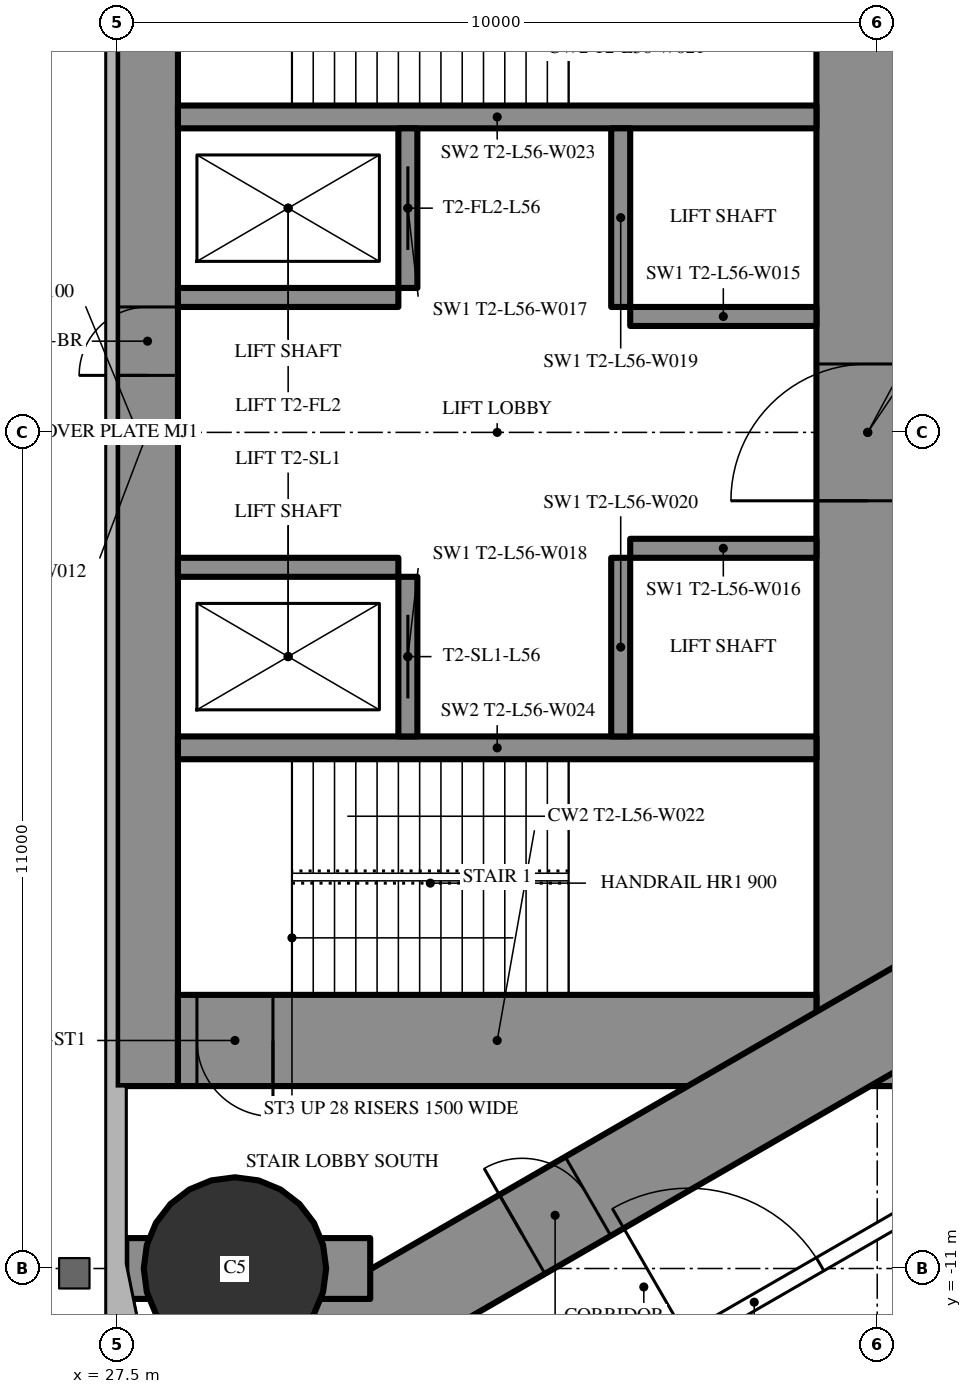
"""IFC4 building model, lengths in metres.
Left out: names, types, materials, properties, quantities, classifications, styles, units other than length and angle.
Written with IfcOpenShell. Run it as: python <this file> out.ifc"""

import sys

from ifc_helpers import new_model, si_unit, direction, frame, frame_2d, origin, origin_2d, place, context, subcontext, project, spatial, rectangle, hollow_circle, extrude, element, fill, save


model = new_model("IFC4")
c1 = context("Model", 3, precision=1e-05, world=origin(), true_north=direction((0.0, 1.0)))
c2 = subcontext(c1, "Body", "Model", "MODEL_VIEW")
j1 = project(units=[si_unit("LENGTHUNIT", "METRE"), si_unit("PLANEANGLEUNIT", "RADIAN")], contexts=[c1])
p1 = place(None, origin())
s1 = spatial("IfcSite", under=j1, at=p1, CompositionType="ELEMENT")
p2 = place(p1, origin())
s2 = spatial("IfcBuilding", under=s1, at=p2, CompositionType="ELEMENT")
p3 = place(p2, frame((0.0, 0.0, 210.3)))
s3 = spatial("IfcBuildingStorey", under=s2, at=p3, CompositionType="ELEMENT", Elevation=210.3)
p4 = place(p3, frame((29.05, -11.0, 0.0), z_axis=(0.0, 0.0, 1.0), x_axis=(1.0, 0.0, 0.0)))
e1 = element("IfcColumn", 1, at=p4, inside=s3, PredefinedType="COLUMN", context=c2, shape_type="SweptSolid", body=[
    extrude(hollow_circle(Radius=1.2, WallThickness=0.09, at=origin_2d()), origin(), (0.0, 0.0, 1.0), 5.0),
])
p5 = place(p3, frame((27.9, -8.6, 0.0), z_axis=(0.0, 0.0, 1.0), x_axis=(0.0, 1.0, 0.0)))
e2 = element("IfcWall", 2, at=p5, inside=s3, PredefinedType="SHEAR", context=c2, shape_type="SweptSolid", body=[
    extrude(rectangle(XDim=17.2, YDim=0.8, at=frame_2d((8.6, 0.0))), origin(), (0.0, 0.0, 1.0), 5.0),
])
p6 = place(p5, frame((9.35, 0.0, 0.0)))
e3 = element("IfcOpeningElement", 3, at=p6, cuts=e2, PredefinedType="OPENING", context=c2, shape_type="SweptSolid", body=[
    extrude(rectangle(XDim=0.9, YDim=2.2, at=frame_2d((0.45, 1.1))), frame((0.0, 0.41, 0.0), z_axis=(0.0, -1.0, 0.0), x_axis=(1.0, 0.0, 0.0)), (0.0, 0.0, 1.0), 0.82),
])
p7 = place(p3, frame((37.375, -8.6, 0.0), z_axis=(0.0, 0.0, 1.0), x_axis=(0.0, 1.0, 0.0)))
e4 = element("IfcWall", 4, at=p7, inside=s3, PredefinedType="SHEAR", context=c2, shape_type="SweptSolid", body=[
    extrude(rectangle(XDim=17.2, YDim=1.35, at=frame_2d((8.6, 0.0))), origin(), (0.0, 0.0, 1.0), 5.0),
])
p8 = place(p7, frame((7.7, 0.0, 0.0)))
e5 = element("IfcOpeningElement", 5, at=p8, cuts=e4, PredefinedType="OPENING", context=c2, shape_type="SweptSolid", body=[
    extrude(rectangle(XDim=1.8, YDim=2.2, at=frame_2d((0.9, 1.1))), frame((0.0, 0.685, 0.0), z_axis=(0.0, -1.0, 0.0), x_axis=(1.0, 0.0, 0.0)), (0.0, 0.0, 1.0), 1.37),
])
p9 = place(p3, frame((28.3, -8.0, 0.0), z_axis=(0.0, 0.0, 1.0), x_axis=(1.0, 0.0, 0.0)))
e6 = element("IfcWall", 6, at=p9, inside=s3, PredefinedType="SHEAR", context=c2, shape_type="SweptSolid", body=[
    extrude(rectangle(XDim=8.4, YDim=1.2, at=frame_2d((4.2, 0.0))), origin(), (0.0, 0.0, 1.0), 5.0),
])
p10 = place(p9, frame((0.25, 0.0, 0.0)))
e7 = element("IfcOpeningElement", 7, at=p10, cuts=e6, PredefinedType="OPENING", context=c2, shape_type="SweptSolid", body=[
    extrude(rectangle(XDim=1.0, YDim=2.2, at=frame_2d((0.5, 1.1))), frame((0.0, 0.61, 0.0), z_axis=(0.0, -1.0, 0.0), x_axis=(1.0, 0.0, 0.0)), (0.0, 0.0, 1.0), 1.22),
])
for number, where, z_axis, x_axis in (
    (8, (28.3, -4.15, 0.0), (0.0, 0.0, 1.0), (1.0, 0.0, 0.0)),
    (9, (28.3, 4.15, 0.0), (0.0, 0.0, 1.0), (1.0, 0.0, 0.0)),
):
    element("IfcWall", number, at=place(p3, frame(where, z_axis=z_axis, x_axis=x_axis)), inside=s3, PredefinedType="SHEAR", context=c2, shape_type="SweptSolid", body=[
        extrude(rectangle(XDim=8.4, YDim=0.3, at=frame_2d((4.2, 0.0))), origin(), (0.0, 0.0, 1.0), 5.0),
    ])
p11 = place(p3, frame((31.325, -4.0, 0.0), z_axis=(0.0, 0.0, 1.0), x_axis=(0.0, 1.0, 0.0)))
e10 = element("IfcWall", 10, at=p11, inside=s3, PredefinedType="SHEAR", context=c2, shape_type="SweptSolid", body=[
    extrude(rectangle(XDim=2.1, YDim=0.25, at=frame_2d((1.05, 0.0))), origin(), (0.0, 0.0, 1.0), 5.0),
])
p12 = place(p11, frame((0.5, 0.0, 0.0)))
e11 = element("IfcOpeningElement", 11, at=p12, cuts=e10, PredefinedType="OPENING", context=c2, shape_type="SweptSolid", body=[
    extrude(rectangle(XDim=1.1, YDim=2.2, at=frame_2d((0.55, 1.1))), frame((0.0, 0.135, 0.0), z_axis=(0.0, -1.0, 0.0), x_axis=(1.0, 0.0, 0.0)), (0.0, 0.0, 1.0), 0.27),
])
p13 = place(p3, frame((34.125, -4.0, 0.0), z_axis=(0.0, 0.0, 1.0), x_axis=(0.0, 1.0, 0.0)))
e12 = element("IfcWall", 12, at=p13, inside=s3, PredefinedType="SHEAR", context=c2, shape_type="SweptSolid", body=[
    extrude(rectangle(XDim=2.35, YDim=0.25, at=frame_2d((1.175, 0.0))), origin(), (0.0, 0.0, 1.0), 5.0),
])
p14 = place(p3, frame((28.3, -1.775, 0.0), z_axis=(0.0, 0.0, 1.0), x_axis=(1.0, 0.0, 0.0)))
e13 = element("IfcWall", 13, at=p14, inside=s3, PredefinedType="SHEAR", context=c2, shape_type="SweptSolid", body=[
    extrude(rectangle(XDim=2.9, YDim=0.25, at=frame_2d((1.45, 0.0))), origin(), (0.0, 0.0, 1.0), 5.0),
])
p15 = place(p3, frame((34.25, -1.525, 0.0), z_axis=(0.0, 0.0, 1.0), x_axis=(1.0, 0.0, 0.0)))
e14 = element("IfcWall", 14, at=p15, inside=s3, PredefinedType="SHEAR", context=c2, shape_type="SweptSolid", body=[
    extrude(rectangle(XDim=2.45, YDim=0.25, at=frame_2d((1.225, 0.0))), origin(), (0.0, 0.0, 1.0), 5.0),
])
p16 = place(p3, frame((31.325, 1.9, 0.0), z_axis=(0.0, 0.0, 1.0), x_axis=(0.0, 1.0, 0.0)))
e15 = element("IfcWall", 15, at=p16, inside=s3, PredefinedType="SHEAR", context=c2, shape_type="SweptSolid", body=[
    extrude(rectangle(XDim=2.1, YDim=0.25, at=frame_2d((1.05, 0.0))), origin(), (0.0, 0.0, 1.0), 5.0),
])
p17 = place(p16, frame((0.5, 0.0, 0.0)))
e16 = element("IfcOpeningElement", 16, at=p17, cuts=e15, PredefinedType="OPENING", context=c2, shape_type="SweptSolid", body=[
    extrude(rectangle(XDim=1.1, YDim=2.2, at=frame_2d((0.55, 1.1))), frame((0.0, 0.135, 0.0), z_axis=(0.0, -1.0, 0.0), x_axis=(1.0, 0.0, 0.0)), (0.0, 0.0, 1.0), 0.27),
])
p18 = place(p3, frame((34.125, 1.65, 0.0), z_axis=(0.0, 0.0, 1.0), x_axis=(0.0, 1.0, 0.0)))
e17 = element("IfcWall", 17, at=p18, inside=s3, PredefinedType="SHEAR", context=c2, shape_type="SweptSolid", body=[
    extrude(rectangle(XDim=2.35, YDim=0.25, at=frame_2d((1.175, 0.0))), origin(), (0.0, 0.0, 1.0), 5.0),
])
p19 = place(p3, frame((28.3, 1.775, 0.0), z_axis=(0.0, 0.0, 1.0), x_axis=(1.0, 0.0, 0.0)))
e18 = element("IfcWall", 18, at=p19, inside=s3, PredefinedType="SHEAR", context=c2, shape_type="SweptSolid", body=[
    extrude(rectangle(XDim=2.9, YDim=0.25, at=frame_2d((1.45, 0.0))), origin(), (0.0, 0.0, 1.0), 5.0),
])
p20 = place(p3, frame((34.25, 1.525, 0.0), z_axis=(0.0, 0.0, 1.0), x_axis=(1.0, 0.0, 0.0)))
e19 = element("IfcWall", 19, at=p20, inside=s3, PredefinedType="SHEAR", context=c2, shape_type="SweptSolid", body=[
    extrude(rectangle(XDim=2.45, YDim=0.25, at=frame_2d((1.225, 0.0))), origin(), (0.0, 0.0, 1.0), 5.0),
])
p21 = place(p3, frame((27.2, -13.8, 0.0), z_axis=(0.0, 0.0, 1.0), x_axis=(0.866027159892, 0.499996958321, 0.0)))
e20 = element("IfcWall", 20, at=p21, inside=s3, PredefinedType="SHEAR", context=c2, shape_type="SweptSolid", body=[
    extrude(rectangle(XDim=27.947, YDim=1.2, at=frame_2d((13.973, 0.0))), origin(), (0.0, 0.0, 1.0), 5.0),
])
p22 = place(p21, frame((6.5, 0.0, 0.0)))
e21 = element("IfcOpeningElement", 21, at=p22, cuts=e20, PredefinedType="OPENING", context=c2, shape_type="SweptSolid", body=[
    extrude(rectangle(XDim=1.0, YDim=2.2, at=frame_2d((0.5, 1.1))), frame((0.0, 0.61, 0.0), z_axis=(0.0, -1.0, 0.0), x_axis=(1.0, 0.0, 0.0)), (0.0, 0.0, 1.0), 1.22),
])
p23 = place(p21, frame((13.568, 0.0, 0.0)))
e22 = element("IfcOpeningElement", 22, at=p23, cuts=e20, PredefinedType="OPENING", context=c2, shape_type="SweptSolid", body=[
    extrude(rectangle(XDim=1.8, YDim=2.2, at=frame_2d((0.9, 1.1))), frame((0.0, 0.61, 0.0), z_axis=(0.0, -1.0, 0.0), x_axis=(1.0, 0.0, 0.0)), (0.0, 0.0, 1.0), 1.22),
])
p24 = place(p3, frame((27.2, 13.8, 0.0), z_axis=(0.0, 0.0, 1.0), x_axis=(0.866024515034, -0.500001539357, 0.0)))
e23 = element("IfcWall", 23, at=p24, inside=s3, PredefinedType="SHEAR", context=c2, shape_type="SweptSolid", body=[
    extrude(rectangle(XDim=26.907, YDim=1.2, at=frame_2d((13.454, 0.0))), origin(), (0.0, 0.0, 1.0), 5.0),
])
p25 = place(p24, frame((6.5, 0.0, 0.0)))
e24 = element("IfcOpeningElement", 24, at=p25, cuts=e23, PredefinedType="OPENING", context=c2, shape_type="SweptSolid", body=[
    extrude(rectangle(XDim=1.0, YDim=2.2, at=frame_2d((0.5, 1.1))), frame((0.0, 0.61, 0.0), z_axis=(0.0, -1.0, 0.0), x_axis=(1.0, 0.0, 0.0)), (0.0, 0.0, 1.0), 1.22),
])
p26 = place(p24, frame((13.568, 0.0, 0.0)))
e25 = element("IfcOpeningElement", 25, at=p26, cuts=e23, PredefinedType="OPENING", context=c2, shape_type="SweptSolid", body=[
    extrude(rectangle(XDim=1.8, YDim=2.2, at=frame_2d((0.9, 1.1))), frame((0.0, 0.61, 0.0), z_axis=(0.0, -1.0, 0.0), x_axis=(1.0, 0.0, 0.0)), (0.0, 0.0, 1.0), 1.22),
])
p27 = place(p3, frame((27.62, -11.0, 0.0), z_axis=(0.0, 0.0, 1.0), x_axis=(1.0, 0.0, 0.0)))
e26 = element("IfcWall", 26, at=p27, inside=s3, PredefinedType="SHEAR", context=c2, shape_type="SweptSolid", body=[
    extrude(rectangle(XDim=3.209, YDim=0.8, at=frame_2d((1.605, 0.0))), origin(), (0.0, 0.0, 1.0), 5.0),
])
p28 = place(p3, frame((28.959, -15.44, 0.0), z_axis=(0.0, 0.0, 1.0), x_axis=(0.866025227435, 0.500000305447, 0.0)))
e27 = element("IfcWall", 27, at=p28, inside=s3, PredefinedType="PARTITIONING", context=c2, shape_type="SweptSolid", body=[
    extrude(rectangle(XDim=30.88, YDim=0.2, at=frame_2d((15.44, 0.0))), origin(), (0.0, 0.0, 1.0), 4.75),
])
p29 = place(p28, frame((6.994, 0.0, 0.0)))
e28 = element("IfcOpeningElement", 28, at=p29, cuts=e27, PredefinedType="OPENING", context=c2, shape_type="SweptSolid", body=[
    extrude(rectangle(XDim=2.0, YDim=2.4, at=frame_2d((1.0, 1.2))), frame((0.0, 0.11, 0.0), z_axis=(0.0, -1.0, 0.0), x_axis=(1.0, 0.0, 0.0)), (0.0, 0.0, 1.0), 0.22),
])
p30 = place(p28, frame((16.36, 0.0, 0.0)))
e29 = element("IfcOpeningElement", 29, at=p30, cuts=e27, PredefinedType="OPENING", context=c2, shape_type="SweptSolid", body=[
    extrude(rectangle(XDim=1.8, YDim=2.2, at=frame_2d((0.9, 1.1))), frame((0.0, 0.11, 0.0), z_axis=(0.0, -1.0, 0.0), x_axis=(1.0, 0.0, 0.0)), (0.0, 0.0, 1.0), 0.22),
])
p31 = place(p28, frame((21.118, 0.0, 0.0)))
e30 = element("IfcOpeningElement", 30, at=p31, cuts=e27, PredefinedType="OPENING", context=c2, shape_type="SweptSolid", body=[
    extrude(rectangle(XDim=1.8, YDim=2.2, at=frame_2d((0.9, 1.1))), frame((0.0, 0.11, 0.0), z_axis=(0.0, -1.0, 0.0), x_axis=(1.0, 0.0, 0.0)), (0.0, 0.0, 1.0), 0.22),
])
p32 = place(p28, frame((25.341, 0.0, 0.0)))
e31 = element("IfcOpeningElement", 31, at=p32, cuts=e27, PredefinedType="OPENING", context=c2, shape_type="SweptSolid", body=[
    extrude(rectangle(XDim=1.8, YDim=2.2, at=frame_2d((0.9, 1.1))), frame((0.0, 0.11, 0.0), z_axis=(0.0, -1.0, 0.0), x_axis=(1.0, 0.0, 0.0)), (0.0, 0.0, 1.0), 0.22),
])
p33 = place(p29, origin())
e32 = element("IfcDoor", 32, at=p33, inside=s3, OperationType="DOUBLE_DOOR_SINGLE_SWING", PredefinedType="DOOR", context=c2, shape_type="SweptSolid", body=[
    extrude(rectangle(XDim=2.0, YDim=2.4, at=frame_2d((1.0, 1.2))), frame((0.0, 0.025, 0.0), z_axis=(0.0, -1.0, 0.0), x_axis=(1.0, 0.0, 0.0)), (0.0, 0.0, 1.0), 0.05),
])
fill(e28, e32)
p34 = place(p22, origin())
e33 = element("IfcDoor", 33, at=p34, inside=s3, OperationType="SINGLE_SWING_LEFT", PredefinedType="DOOR", context=c2, shape_type="SweptSolid", body=[
    extrude(rectangle(XDim=1.0, YDim=2.2, at=frame_2d((0.5, 1.1))), frame((0.0, 0.025, 0.0), z_axis=(0.0, -1.0, 0.0), x_axis=(1.0, 0.0, 0.0)), (0.0, 0.0, 1.0), 0.05),
])
fill(e21, e33)
p35 = place(p8, origin())
e34 = element("IfcDoor", 34, at=p35, inside=s3, OperationType="DOUBLE_DOOR_SINGLE_SWING", PredefinedType="DOOR", context=c2, shape_type="SweptSolid", body=[
    extrude(rectangle(XDim=1.8, YDim=2.2, at=frame_2d((0.9, 1.1))), frame((0.0, 0.025, 0.0), z_axis=(0.0, -1.0, 0.0), x_axis=(1.0, 0.0, 0.0)), (0.0, 0.0, 1.0), 0.05),
])
fill(e5, e34)
p36 = place(p10, origin())
e35 = element("IfcDoor", 35, at=p36, inside=s3, OperationType="SINGLE_SWING_RIGHT", PredefinedType="DOOR", context=c2, shape_type="SweptSolid", body=[
    extrude(rectangle(XDim=1.0, YDim=2.2, at=frame_2d((0.5, 1.1))), frame((0.0, 0.025, 0.0), z_axis=(0.0, -1.0, 0.0), x_axis=(1.0, 0.0, 0.0)), (0.0, 0.0, 1.0), 0.05),
])
fill(e7, e35)
p37 = place(p6, origin())
e36 = element("IfcDoor", 36, at=p37, inside=s3, OperationType="SINGLE_SWING_LEFT", PredefinedType="DOOR", context=c2, shape_type="SweptSolid", body=[
    extrude(rectangle(XDim=0.9, YDim=2.2, at=frame_2d((0.45, 1.1))), frame((0.0, 0.025, 0.0), z_axis=(0.0, -1.0, 0.0), x_axis=(1.0, 0.0, 0.0)), (0.0, 0.0, 1.0), 0.05),
])
fill(e3, e36)
p38 = place(p12, origin())
e37 = element("IfcDoor", 37, at=p38, inside=s3, OperationType="SLIDING_TO_LEFT", PredefinedType="USERDEFINED", context=c2, shape_type="SweptSolid", body=[
    extrude(rectangle(XDim=1.1, YDim=2.2, at=frame_2d((0.55, 1.1))), frame((0.0, 0.025, 0.0), z_axis=(0.0, -1.0, 0.0), x_axis=(1.0, 0.0, 0.0)), (0.0, 0.0, 1.0), 0.05),
])
fill(e11, e37)
p39 = place(p17, origin())
e38 = element("IfcDoor", 38, at=p39, inside=s3, OperationType="SLIDING_TO_LEFT", PredefinedType="USERDEFINED", context=c2, shape_type="SweptSolid", body=[
    extrude(rectangle(XDim=1.1, YDim=2.2, at=frame_2d((0.55, 1.1))), frame((0.0, 0.025, 0.0), z_axis=(0.0, -1.0, 0.0), x_axis=(1.0, 0.0, 0.0)), (0.0, 0.0, 1.0), 0.05),
])
fill(e16, e38)
save(model, sys.argv[1])
